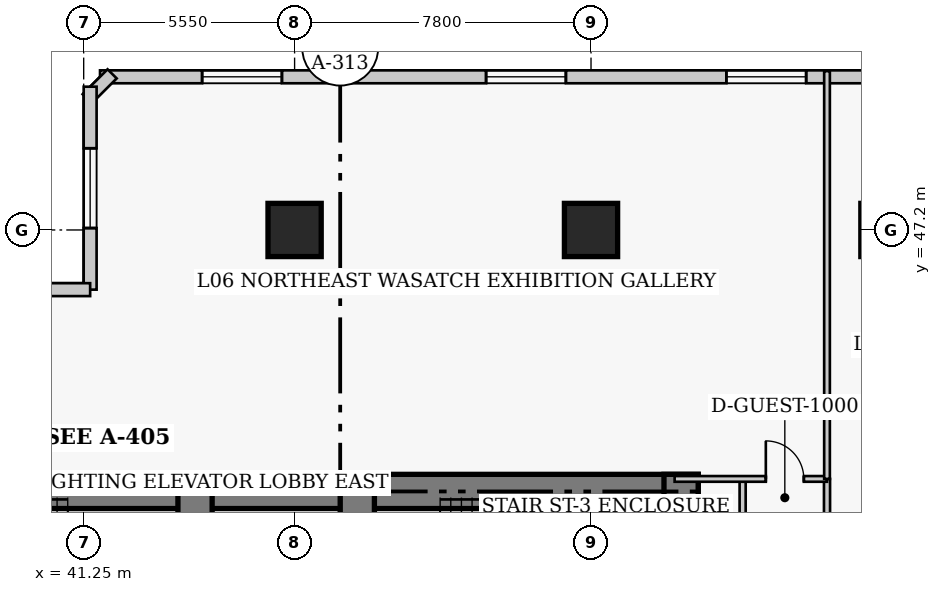
"""IFC4 building model, lengths in metres.
Left out: names, types, materials, properties, quantities, classifications, styles, units other than length and angle.
Written with IfcOpenShell. Run it as: python <this file> out.ifc"""

import sys

from ifc_helpers import new_model, si_unit, direction, frame, frame_2d, origin, origin_2d, place, context, subcontext, project, spatial, rectangle, extrude, element, fill, save


model = new_model("IFC4")
c1 = context("Model", 3, precision=1e-05, world=origin(), true_north=direction((0.0, 1.0)))
c2 = subcontext(c1, "Body", "Model", "MODEL_VIEW")
j1 = project(units=[si_unit("LENGTHUNIT", "METRE"), si_unit("PLANEANGLEUNIT", "RADIAN")], contexts=[c1])
p1 = place(None, origin())
s1 = spatial("IfcSite", under=j1, at=p1, CompositionType="ELEMENT")
p2 = place(p1, origin())
s2 = spatial("IfcBuilding", under=s1, at=p2, CompositionType="ELEMENT")
p3 = place(p2, frame((0.0, 0.0, 29.8)))
s3 = spatial("IfcBuildingStorey", under=s2, at=p3, CompositionType="ELEMENT", Elevation=29.8)
p4 = place(p3, frame((35.85, 40.32, 0.0), z_axis=(0.0, 0.0, 1.0), x_axis=(1.0, 0.0, 0.0)))
e1 = element("IfcWall", 1, at=p4, inside=s3, PredefinedType="SHEAR", context=c2, shape_type="SweptSolid", body=[
    extrude(rectangle(XDim=12.6, YDim=0.9, at=frame_2d((6.3, 0.0))), origin(), (0.0, 0.0, 1.0), 3.8),
])
p5 = place(p3, frame((48.45, 40.32, 0.0), z_axis=(0.0, 0.0, 1.0), x_axis=(1.0, 0.0, 0.0)))
e2 = element("IfcWall", 2, at=p5, inside=s3, PredefinedType="SHEAR", context=c2, shape_type="SweptSolid", body=[
    extrude(rectangle(XDim=8.97, YDim=0.9, at=frame_2d((4.485, 0.0))), origin(), (0.0, 0.0, 1.0), 3.8),
])
p6 = place(p3, frame((56.97, 27.05, 0.0), z_axis=(0.0, 0.0, 1.0), x_axis=(0.0, 1.0, 0.0)))
e3 = element("IfcWall", 3, at=p6, inside=s3, PredefinedType="SHEAR", context=c2, shape_type="SweptSolid", body=[
    extrude(rectangle(XDim=13.72, YDim=0.9, at=frame_2d((6.86, 0.0))), origin(), (0.0, 0.0, 1.0), 3.8),
])
p7 = place(p3, frame((44.18, 36.37, 0.0), z_axis=(0.0, 0.0, 1.0), x_axis=(0.0, 1.0, 0.0)))
e4 = element("IfcWall", 4, at=p7, inside=s3, PredefinedType="SHEAR", context=c2, shape_type="SweptSolid", body=[
    extrude(rectangle(XDim=3.95, YDim=0.9, at=frame_2d((1.975, 0.0))), origin(), (0.0, 0.0, 1.0), 3.8),
])
p8 = place(p3, frame((48.45, 32.3, 0.0), z_axis=(0.0, 0.0, 1.0), x_axis=(0.0, 1.0, 0.0)))
e5 = element("IfcWall", 5, at=p8, inside=s3, PredefinedType="SHEAR", context=c2, shape_type="SweptSolid", body=[
    extrude(rectangle(XDim=8.02, YDim=0.9, at=frame_2d((4.01, 0.0))), origin(), (0.0, 0.0, 1.0), 3.8),
])
p9 = place(p8, frame((5.9, 0.0, 0.0)))
e6 = element("IfcOpeningElement", 6, at=p9, cuts=e5, PredefinedType="OPENING", context=c2, shape_type="SweptSolid", body=[
    extrude(rectangle(XDim=1.1, YDim=2.15, at=frame_2d((0.55, 1.075))), frame((0.0, 0.46, 0.0), z_axis=(0.0, -1.0, 0.0), x_axis=(1.0, 0.0, 0.0)), (0.0, 0.0, 1.0), 0.92),
])
for number, where, z_axis, x_axis in (
    (7, (46.8, 47.2, 0.0), (0.0, 0.0, 1.0), (1.0, 0.0, 0.0)),
    (8, (54.6, 47.2, 0.0), (0.0, 0.0, 1.0), (1.0, 0.0, 0.0)),
):
    element("IfcColumn", number, at=place(p3, frame(where, z_axis=z_axis, x_axis=x_axis)), inside=s3, PredefinedType="COLUMN", context=c2, shape_type="SweptSolid", body=[
        extrude(rectangle(XDim=1.4, YDim=1.4, at=origin_2d()), origin(), (0.0, 0.0, 1.0), 3.8),
    ])
p10 = place(p3, frame((71.57, 51.23, 0.0), z_axis=(0.0, 0.0, 1.0), x_axis=(-1.0, 0.0, 0.0)))
e9 = element("IfcWall", 9, at=p10, inside=s3, PredefinedType="SOLIDWALL", context=c2, shape_type="SweptSolid", body=[
    extrude(rectangle(XDim=29.89, YDim=0.34, at=frame_2d((14.945, 0.0))), origin(), (0.0, 0.0, 1.0), 3.54),
])
p11 = place(p10, frame((2.686, 0.0, 0.85)))
e10 = element("IfcOpeningElement", 10, at=p11, cuts=e9, PredefinedType="OPENING", context=c2, shape_type="SweptSolid", body=[
    extrude(rectangle(XDim=2.1, YDim=1.85, at=frame_2d((1.05, 0.925))), frame((0.0, 0.18, 0.0), z_axis=(0.0, -1.0, 0.0), x_axis=(1.0, 0.0, 0.0)), (0.0, 0.0, 1.0), 0.36),
])
p12 = place(p10, frame((11.309, 0.0, 0.85)))
e11 = element("IfcOpeningElement", 11, at=p12, cuts=e9, PredefinedType="OPENING", context=c2, shape_type="SweptSolid", body=[
    extrude(rectangle(XDim=2.1, YDim=1.85, at=frame_2d((1.05, 0.925))), frame((0.0, 0.18, 0.0), z_axis=(0.0, -1.0, 0.0), x_axis=(1.0, 0.0, 0.0)), (0.0, 0.0, 1.0), 0.36),
])
p13 = place(p10, frame((17.631, 0.0, 0.85)))
e12 = element("IfcOpeningElement", 12, at=p13, cuts=e9, PredefinedType="OPENING", context=c2, shape_type="SweptSolid", body=[
    extrude(rectangle(XDim=2.1, YDim=1.85, at=frame_2d((1.05, 0.925))), frame((0.0, 0.18, 0.0), z_axis=(0.0, -1.0, 0.0), x_axis=(1.0, 0.0, 0.0)), (0.0, 0.0, 1.0), 0.36),
])
p14 = place(p10, frame((25.104, 0.0, 0.85)))
e13 = element("IfcOpeningElement", 13, at=p14, cuts=e9, PredefinedType="OPENING", context=c2, shape_type="SweptSolid", body=[
    extrude(rectangle(XDim=2.1, YDim=1.85, at=frame_2d((1.05, 0.925))), frame((0.0, 0.18, 0.0), z_axis=(0.0, -1.0, 0.0), x_axis=(1.0, 0.0, 0.0)), (0.0, 0.0, 1.0), 0.36),
])
p15 = place(p3, frame((41.999, 51.308, 0.0), z_axis=(0.0, 0.0, 1.0), x_axis=(-0.707238225886, -0.706975312048, 0.0)))
e14 = element("IfcWall", 14, at=p15, inside=s3, PredefinedType="SOLIDWALL", context=c2, shape_type="SweptSolid", body=[
    extrude(rectangle(XDim=0.929, YDim=0.34, at=frame_2d((0.464, 0.0))), origin(), (0.0, 0.0, 1.0), 3.54),
])
p16 = place(p3, frame((41.42, 50.97, 0.0), z_axis=(0.0, 0.0, 1.0), x_axis=(0.0, -1.0, 0.0)))
e15 = element("IfcWall", 15, at=p16, inside=s3, PredefinedType="SOLIDWALL", context=c2, shape_type="SweptSolid", body=[
    extrude(rectangle(XDim=5.34, YDim=0.34, at=frame_2d((2.67, 0.0))), origin(), (0.0, 0.0, 1.0), 3.54),
])
p17 = place(p16, frame((1.62, 0.0, 0.85)))
e16 = element("IfcOpeningElement", 16, at=p17, cuts=e15, PredefinedType="OPENING", context=c2, shape_type="SweptSolid", body=[
    extrude(rectangle(XDim=2.1, YDim=1.85, at=frame_2d((1.05, 0.925))), frame((0.0, 0.18, 0.0), z_axis=(0.0, -1.0, 0.0), x_axis=(1.0, 0.0, 0.0)), (0.0, 0.0, 1.0), 0.36),
])
p18 = place(p3, frame((41.42, 45.63, 0.0), z_axis=(0.0, 0.0, 1.0), x_axis=(-1.0, 0.0, 0.0)))
e17 = element("IfcWall", 17, at=p18, inside=s3, PredefinedType="SOLIDWALL", context=c2, shape_type="SweptSolid", body=[
    extrude(rectangle(XDim=4.84, YDim=0.34, at=frame_2d((2.42, 0.0))), origin(), (0.0, 0.0, 1.0), 3.54),
])
p19 = place(p18, frame((1.37, 0.0, 0.85)))
e18 = element("IfcOpeningElement", 18, at=p19, cuts=e17, PredefinedType="OPENING", context=c2, shape_type="SweptSolid", body=[
    extrude(rectangle(XDim=2.1, YDim=1.85, at=frame_2d((1.05, 0.925))), frame((0.0, 0.18, 0.0), z_axis=(0.0, -1.0, 0.0), x_axis=(1.0, 0.0, 0.0)), (0.0, 0.0, 1.0), 0.36),
])
p20 = place(p3, frame((60.81, 10.25, 0.0), z_axis=(0.0, 0.0, 1.0), x_axis=(0.0, 1.0, 0.0)))
e19 = element("IfcWall", 19, at=p20, inside=s3, PredefinedType="PARTITIONING", context=c2, shape_type="SweptSolid", body=[
    extrude(rectangle(XDim=30.4, YDim=0.16, at=frame_2d((15.2, 0.0))), origin(), (0.0, 0.0, 1.0), 3.54),
])
p21 = place(p20, frame((4.4, 0.0, 0.0)))
e20 = element("IfcOpeningElement", 20, at=p21, cuts=e19, PredefinedType="OPENING", context=c2, shape_type="SweptSolid", body=[
    extrude(rectangle(XDim=0.95, YDim=2.1, at=frame_2d((0.475, 1.05))), frame((0.0, 0.09, 0.0), z_axis=(0.0, -1.0, 0.0), x_axis=(1.0, 0.0, 0.0)), (0.0, 0.0, 1.0), 0.18),
])
p22 = place(p20, frame((13.175, 0.0, 0.0)))
e21 = element("IfcOpeningElement", 21, at=p22, cuts=e19, PredefinedType="OPENING", context=c2, shape_type="SweptSolid", body=[
    extrude(rectangle(XDim=0.95, YDim=2.1, at=frame_2d((0.475, 1.05))), frame((0.0, 0.09, 0.0), z_axis=(0.0, -1.0, 0.0), x_axis=(1.0, 0.0, 0.0)), (0.0, 0.0, 1.0), 0.18),
])
p23 = place(p20, frame((20.975, 0.0, 0.0)))
e22 = element("IfcOpeningElement", 22, at=p23, cuts=e19, PredefinedType="OPENING", context=c2, shape_type="SweptSolid", body=[
    extrude(rectangle(XDim=0.95, YDim=2.1, at=frame_2d((0.475, 1.05))), frame((0.0, 0.09, 0.0), z_axis=(0.0, -1.0, 0.0), x_axis=(1.0, 0.0, 0.0)), (0.0, 0.0, 1.0), 0.18),
])
p24 = place(p20, frame((25.9, 0.0, 0.0)))
e23 = element("IfcOpeningElement", 23, at=p24, cuts=e19, PredefinedType="OPENING", context=c2, shape_type="SweptSolid", body=[
    extrude(rectangle(XDim=1.0, YDim=2.15, at=frame_2d((0.5, 1.075))), frame((0.0, 0.09, 0.0), z_axis=(0.0, -1.0, 0.0), x_axis=(1.0, 0.0, 0.0)), (0.0, 0.0, 1.0), 0.18),
])
p25 = place(p3, frame((58.59, 26.41, 0.0), z_axis=(0.0, 0.0, 1.0), x_axis=(0.0, 1.0, 0.0)))
e24 = element("IfcWall", 24, at=p25, inside=s3, PredefinedType="PARTITIONING", context=c2, shape_type="SweptSolid", body=[
    extrude(rectangle(XDim=14.24, YDim=0.16, at=frame_2d((7.12, 0.0))), origin(), (0.0, 0.0, 1.0), 3.54),
])
p26 = place(p3, frame((56.8, 40.65, 0.0), z_axis=(0.0, 0.0, 1.0), x_axis=(1.0, 0.0, 0.0)))
e25 = element("IfcWall", 25, at=p26, inside=s3, PredefinedType="PARTITIONING", context=c2, shape_type="SweptSolid", body=[
    extrude(rectangle(XDim=4.01, YDim=0.15, at=frame_2d((2.005, 0.0))), origin(), (0.0, 0.0, 1.0), 3.54),
])
p27 = place(p26, frame((2.4, 0.0, 0.0)))
e26 = element("IfcOpeningElement", 26, at=p27, cuts=e25, PredefinedType="OPENING", context=c2, shape_type="SweptSolid", body=[
    extrude(rectangle(XDim=1.0, YDim=2.15, at=frame_2d((0.5, 1.075))), frame((0.0, 0.085, 0.0), z_axis=(0.0, -1.0, 0.0), x_axis=(1.0, 0.0, 0.0)), (0.0, 0.0, 1.0), 0.17),
])
p28 = place(p3, frame((60.81, 40.65, 0.0), z_axis=(0.0, 0.0, 1.0), x_axis=(0.0, 1.0, 0.0)))
e27 = element("IfcWall", 27, at=p28, inside=s3, PredefinedType="PARTITIONING", context=c2, shape_type="SweptSolid", body=[
    extrude(rectangle(XDim=10.73, YDim=0.15, at=frame_2d((5.365, 0.0))), origin(), (0.0, 0.0, 1.0), 3.54),
])
p29 = place(p12, origin())
e28 = element("IfcWindow", 28, at=p29, inside=s3, PartitioningType="SINGLE_PANEL", PredefinedType="WINDOW", context=c2, shape_type="SweptSolid", body=[
    extrude(rectangle(XDim=2.1, YDim=1.85, at=frame_2d((1.05, 0.925))), frame((0.0, 0.03, 0.0), z_axis=(0.0, -1.0, 0.0), x_axis=(1.0, 0.0, 0.0)), (0.0, 0.0, 1.0), 0.06),
])
fill(e11, e28)
p30 = place(p13, origin())
e29 = element("IfcWindow", 29, at=p30, inside=s3, PartitioningType="SINGLE_PANEL", PredefinedType="WINDOW", context=c2, shape_type="SweptSolid", body=[
    extrude(rectangle(XDim=2.1, YDim=1.85, at=frame_2d((1.05, 0.925))), frame((0.0, 0.03, 0.0), z_axis=(0.0, -1.0, 0.0), x_axis=(1.0, 0.0, 0.0)), (0.0, 0.0, 1.0), 0.06),
])
fill(e12, e29)
p31 = place(p14, origin())
e30 = element("IfcWindow", 30, at=p31, inside=s3, PartitioningType="SINGLE_PANEL", PredefinedType="WINDOW", context=c2, shape_type="SweptSolid", body=[
    extrude(rectangle(XDim=2.1, YDim=1.85, at=frame_2d((1.05, 0.925))), frame((0.0, 0.03, 0.0), z_axis=(0.0, -1.0, 0.0), x_axis=(1.0, 0.0, 0.0)), (0.0, 0.0, 1.0), 0.06),
])
fill(e13, e30)
p32 = place(p17, origin())
e31 = element("IfcWindow", 31, at=p32, inside=s3, PartitioningType="SINGLE_PANEL", PredefinedType="WINDOW", context=c2, shape_type="SweptSolid", body=[
    extrude(rectangle(XDim=2.1, YDim=1.85, at=frame_2d((1.05, 0.925))), frame((0.0, 0.03, 0.0), z_axis=(0.0, -1.0, 0.0), x_axis=(1.0, 0.0, 0.0)), (0.0, 0.0, 1.0), 0.06),
])
fill(e16, e31)
p33 = place(p27, origin())
e32 = element("IfcDoor", 32, at=p33, inside=s3, OperationType="SINGLE_SWING_LEFT", PredefinedType="DOOR", context=c2, shape_type="SweptSolid", body=[
    extrude(rectangle(XDim=1.0, YDim=2.15, at=frame_2d((0.5, 1.075))), frame((0.0, 0.025, 0.0), z_axis=(0.0, -1.0, 0.0), x_axis=(1.0, 0.0, 0.0)), (0.0, 0.0, 1.0), 0.05),
])
fill(e26, e32)
save(model, sys.argv[1])
